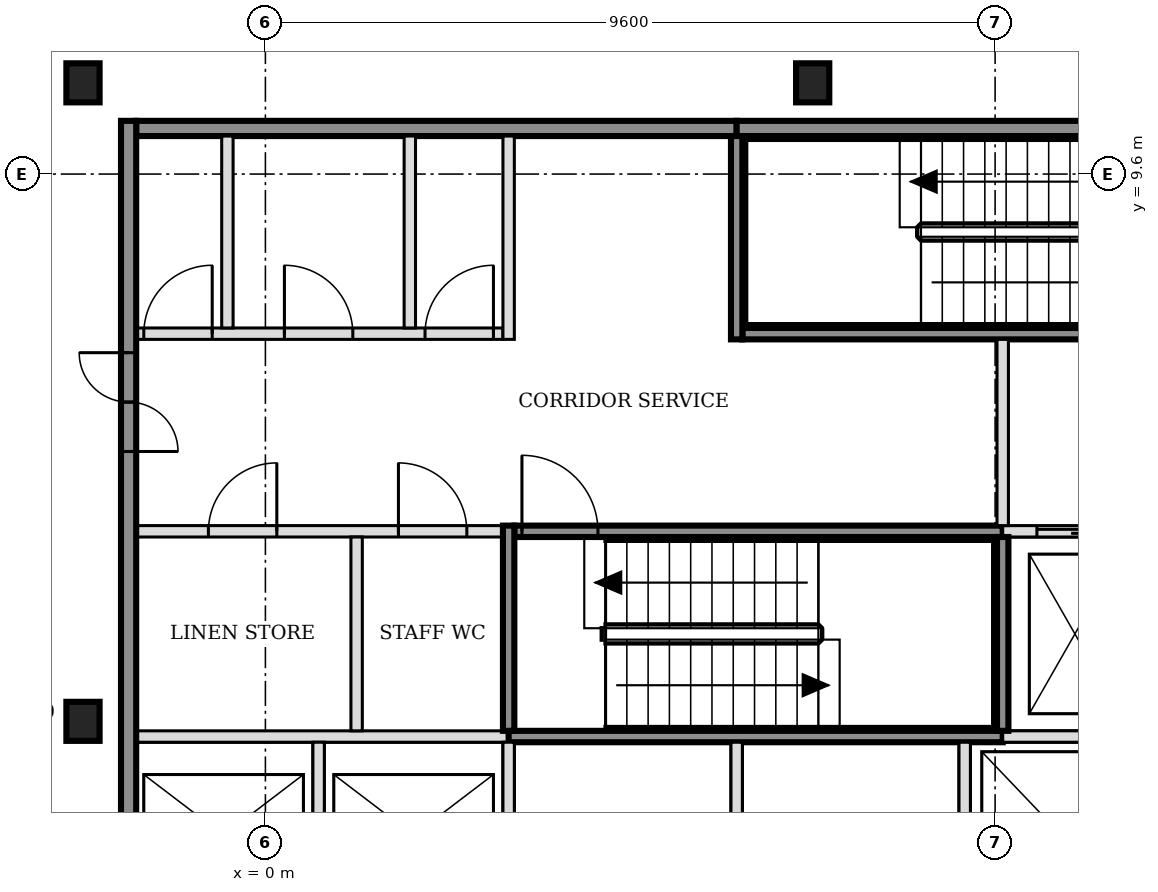
"""IFC4 building model, lengths in metres.
Left out: names, types, materials, properties, quantities, classifications, styles, units other than length and angle.
Written with IfcOpenShell. Run it as: python <this file> out.ifc"""

import sys

from ifc_helpers import new_model, si_unit, direction, frame, frame_2d, origin, origin_2d, place, context, subcontext, project, spatial, rectangle, i_section, extrude, element, fill, save


model = new_model("IFC4")
c1 = context("Model", 3, precision=1e-05, world=origin(), true_north=direction((0.0, 1.0)))
c2 = subcontext(c1, "Body", "Model", "MODEL_VIEW")
j1 = project(units=[si_unit("LENGTHUNIT", "METRE"), si_unit("PLANEANGLEUNIT", "RADIAN")], contexts=[c1])
p1 = place(None, origin())
s1 = spatial("IfcSite", under=j1, at=p1, CompositionType="ELEMENT")
p2 = place(p1, origin())
s2 = spatial("IfcBuilding", under=s1, at=p2, CompositionType="ELEMENT")
p3 = place(p2, frame((0.0, 0.0, 79.8)))
s3 = spatial("IfcBuildingStorey", under=s2, at=p3, CompositionType="ELEMENT", Elevation=79.8)
for number, where, z_axis, x_axis in (
    (1, (-2.4, 2.4, -0.15), (0.0, 0.0, 1.0), (1.0, 0.0, 0.0)),
    (2, (-2.4, 10.8, -0.15), (0.0, 0.0, 1.0), (1.0, 0.0, 0.0)),
    (3, (7.2, 10.8, -0.15), (0.0, 0.0, 1.0), (1.0, 0.0, 0.0)),
):
    element("IfcColumn", number, at=place(p3, frame(where, z_axis=z_axis, x_axis=x_axis)), inside=s3, PredefinedType="COLUMN", context=c2, shape_type="SweptSolid", body=[
        extrude(i_section(OverallWidth=0.437, OverallDepth=0.514, WebThickness=0.061, FlangeThickness=0.097, FilletRadius=0.015, at=origin_2d()), origin(), (0.0, 0.0, 1.0), 3.6),
    ])
p4 = place(p3, frame((-1.7, 2.2, 0.0), z_axis=(0.0, 0.0, 1.0), x_axis=(1.0, 0.0, 0.0)))
e4 = element("IfcWall", 4, at=p4, inside=s3, PredefinedType="SOLIDWALL", context=c2, shape_type="SweptSolid", body=[
    extrude(rectangle(XDim=4.9, YDim=0.15, at=frame_2d((2.45, 0.0))), origin(), (0.0, 0.0, 1.0), 3.45),
])
p5 = place(p3, frame((3.2, 2.2, 0.0), z_axis=(0.0, 0.0, 1.0), x_axis=(1.0, 0.0, 0.0)))
e5 = element("IfcWall", 5, at=p5, inside=s3, PredefinedType="SOLIDWALL", context=c2, shape_type="SweptSolid", body=[
    extrude(rectangle(XDim=6.5, YDim=0.15, at=frame_2d((3.25, 0.0))), origin(), (0.0, 0.0, 1.0), 3.45),
])
p6 = place(p3, frame((9.7, 2.2, 0.0), z_axis=(0.0, 0.0, 1.0), x_axis=(1.0, 0.0, 0.0)))
e6 = element("IfcWall", 6, at=p6, inside=s3, PredefinedType="SOLIDWALL", context=c2, shape_type="SweptSolid", body=[
    extrude(rectangle(XDim=4.525, YDim=0.15, at=frame_2d((2.263, 0.0))), origin(), (0.0, 0.0, 1.0), 3.45),
])
p7 = place(p3, frame((-1.7, 4.9, 0.0), z_axis=(0.0, 0.0, 1.0), x_axis=(1.0, 0.0, 0.0)))
e7 = element("IfcWall", 7, at=p7, inside=s3, PredefinedType="PARTITIONING", context=c2, shape_type="SweptSolid", body=[
    extrude(rectangle(XDim=4.825, YDim=0.15, at=frame_2d((2.413, 0.0))), origin(), (0.0, 0.0, 1.0), 3.45),
])
p8 = place(p7, frame((0.95, 0.0, 0.0)))
e8 = element("IfcOpeningElement", 8, at=p8, cuts=e7, PredefinedType="OPENING", context=c2, shape_type="SweptSolid", body=[
    extrude(rectangle(XDim=0.9, YDim=2.1, at=frame_2d((0.45, 1.05))), frame((0.0, 0.085, 0.0), z_axis=(0.0, -1.0, 0.0), x_axis=(1.0, 0.0, 0.0)), (0.0, 0.0, 1.0), 0.17),
])
p9 = place(p7, frame((3.45, 0.0, 0.0)))
e9 = element("IfcOpeningElement", 9, at=p9, cuts=e7, PredefinedType="OPENING", context=c2, shape_type="SweptSolid", body=[
    extrude(rectangle(XDim=0.9, YDim=2.1, at=frame_2d((0.45, 1.05))), frame((0.0, 0.085, 0.0), z_axis=(0.0, -1.0, 0.0), x_axis=(1.0, 0.0, 0.0)), (0.0, 0.0, 1.0), 0.17),
])
p10 = place(p3, frame((3.275, 4.9, 0.0), z_axis=(0.0, 0.0, 1.0), x_axis=(1.0, 0.0, 0.0)))
e10 = element("IfcWall", 10, at=p10, inside=s3, PredefinedType="SOLIDWALL", context=c2, shape_type="SweptSolid", body=[
    extrude(rectangle(XDim=6.425, YDim=0.15, at=frame_2d((3.212, 0.0))), origin(), (0.0, 0.0, 1.0), 3.45),
])
p11 = place(p10, frame((0.1, 0.0, 0.0)))
e11 = element("IfcOpeningElement", 11, at=p11, cuts=e10, PredefinedType="OPENING", context=c2, shape_type="SweptSolid", body=[
    extrude(rectangle(XDim=1.0, YDim=2.1, at=frame_2d((0.5, 1.05))), frame((0.0, 0.085, 0.0), z_axis=(0.0, -1.0, 0.0), x_axis=(1.0, 0.0, 0.0)), (0.0, 0.0, 1.0), 0.17),
])
p12 = place(p3, frame((9.7, 4.9, 0.0), z_axis=(0.0, 0.0, 1.0), x_axis=(1.0, 0.0, 0.0)))
e12 = element("IfcWall", 12, at=p12, inside=s3, PredefinedType="SOLIDWALL", context=c2, shape_type="SweptSolid", body=[
    extrude(rectangle(XDim=6.4, YDim=0.15, at=frame_2d((3.2, 0.0))), origin(), (0.0, 0.0, 1.0), 3.45),
])
p13 = place(p12, frame((0.45, 0.0, 0.0)))
e13 = element("IfcOpeningElement", 13, at=p13, cuts=e12, PredefinedType="OPENING", context=c2, shape_type="SweptSolid", body=[
    extrude(rectangle(XDim=1.0, YDim=2.1, at=frame_2d((0.5, 1.05))), frame((0.0, 0.085, 0.0), z_axis=(0.0, -1.0, 0.0), x_axis=(1.0, 0.0, 0.0)), (0.0, 0.0, 1.0), 0.17),
])
p14 = place(p12, frame((2.35, 0.0, 0.0)))
e14 = element("IfcOpeningElement", 14, at=p14, cuts=e12, PredefinedType="OPENING", context=c2, shape_type="SweptSolid", body=[
    extrude(rectangle(XDim=1.0, YDim=2.1, at=frame_2d((0.5, 1.05))), frame((0.0, 0.085, 0.0), z_axis=(0.0, -1.0, 0.0), x_axis=(1.0, 0.0, 0.0)), (0.0, 0.0, 1.0), 0.17),
])
p15 = place(p12, frame((4.7, 0.0, 0.0)))
e15 = element("IfcOpeningElement", 15, at=p15, cuts=e12, PredefinedType="OPENING", context=c2, shape_type="SweptSolid", body=[
    extrude(rectangle(XDim=0.9, YDim=2.1, at=frame_2d((0.45, 1.05))), frame((0.0, 0.085, 0.0), z_axis=(0.0, -1.0, 0.0), x_axis=(1.0, 0.0, 0.0)), (0.0, 0.0, 1.0), 0.17),
])
p16 = place(p3, frame((-1.7, 7.5, 0.0), z_axis=(0.0, 0.0, 1.0), x_axis=(1.0, 0.0, 0.0)))
e16 = element("IfcWall", 16, at=p16, inside=s3, PredefinedType="PARTITIONING", context=c2, shape_type="SweptSolid", body=[
    extrude(rectangle(XDim=4.825, YDim=0.15, at=frame_2d((2.413, 0.0))), origin(), (0.0, 0.0, 1.0), 3.45),
])
p17 = place(p16, frame((0.1, 0.0, 0.0)))
e17 = element("IfcOpeningElement", 17, at=p17, cuts=e16, PredefinedType="OPENING", context=c2, shape_type="SweptSolid", body=[
    extrude(rectangle(XDim=0.9, YDim=2.1, at=frame_2d((0.45, 1.05))), frame((0.0, 0.085, 0.0), z_axis=(0.0, -1.0, 0.0), x_axis=(1.0, 0.0, 0.0)), (0.0, 0.0, 1.0), 0.17),
])
p18 = place(p16, frame((1.95, 0.0, 0.0)))
e18 = element("IfcOpeningElement", 18, at=p18, cuts=e16, PredefinedType="OPENING", context=c2, shape_type="SweptSolid", body=[
    extrude(rectangle(XDim=0.9, YDim=2.1, at=frame_2d((0.45, 1.05))), frame((0.0, 0.085, 0.0), z_axis=(0.0, -1.0, 0.0), x_axis=(1.0, 0.0, 0.0)), (0.0, 0.0, 1.0), 0.17),
])
p19 = place(p16, frame((3.8, 0.0, 0.0)))
e19 = element("IfcOpeningElement", 19, at=p19, cuts=e16, PredefinedType="OPENING", context=c2, shape_type="SweptSolid", body=[
    extrude(rectangle(XDim=0.9, YDim=2.1, at=frame_2d((0.45, 1.05))), frame((0.0, 0.085, 0.0), z_axis=(0.0, -1.0, 0.0), x_axis=(1.0, 0.0, 0.0)), (0.0, 0.0, 1.0), 0.17),
])
p20 = place(p3, frame((6.275, 7.5, 0.0), z_axis=(0.0, 0.0, 1.0), x_axis=(1.0, 0.0, 0.0)))
e20 = element("IfcWall", 20, at=p20, inside=s3, PredefinedType="SOLIDWALL", context=c2, shape_type="SweptSolid", body=[
    extrude(rectangle(XDim=6.425, YDim=0.15, at=frame_2d((3.212, 0.0))), origin(), (0.0, 0.0, 1.0), 3.45),
])
p21 = place(p20, frame((5.225, 0.0, 0.0)))
e21 = element("IfcOpeningElement", 21, at=p21, cuts=e20, PredefinedType="OPENING", context=c2, shape_type="SweptSolid", body=[
    extrude(rectangle(XDim=1.0, YDim=2.1, at=frame_2d((0.5, 1.05))), frame((0.0, 0.085, 0.0), z_axis=(0.0, -1.0, 0.0), x_axis=(1.0, 0.0, 0.0)), (0.0, 0.0, 1.0), 0.17),
])
p22 = place(p3, frame((-1.7, 10.2, 0.0), z_axis=(0.0, 0.0, 1.0), x_axis=(1.0, 0.0, 0.0)))
e22 = element("IfcWall", 22, at=p22, inside=s3, PredefinedType="SOLIDWALL", context=c2, shape_type="SweptSolid", body=[
    extrude(rectangle(XDim=7.9, YDim=0.2, at=frame_2d((3.95, 0.0))), origin(), (0.0, 0.0, 1.0), 3.45),
])
p23 = place(p3, frame((6.2, 10.2, 0.0), z_axis=(0.0, 0.0, 1.0), x_axis=(1.0, 0.0, 0.0)))
e23 = element("IfcWall", 23, at=p23, inside=s3, PredefinedType="SOLIDWALL", context=c2, shape_type="SweptSolid", body=[
    extrude(rectangle(XDim=6.5, YDim=0.2, at=frame_2d((3.25, 0.0))), origin(), (0.0, 0.0, 1.0), 3.45),
])
p24 = place(p3, frame((-1.8, -5.5, 0.0), z_axis=(0.0, 0.0, 1.0), x_axis=(0.0, 1.0, 0.0)))
e24 = element("IfcWall", 24, at=p24, inside=s3, PredefinedType="SOLIDWALL", context=c2, shape_type="SweptSolid", body=[
    extrude(rectangle(XDim=15.8, YDim=0.2, at=frame_2d((7.9, 0.0))), origin(), (0.0, 0.0, 1.0), 3.45),
])
p25 = place(p24, frame((3.05, 0.0, 0.0)))
e25 = element("IfcOpeningElement", 25, at=p25, cuts=e24, PredefinedType="OPENING", context=c2, shape_type="SweptSolid", body=[
    extrude(rectangle(XDim=1.3, YDim=2.1, at=frame_2d((0.65, 1.05))), frame((0.0, 0.11, 0.0), z_axis=(0.0, -1.0, 0.0), x_axis=(1.0, 0.0, 0.0)), (0.0, 0.0, 1.0), 0.22),
])
p26 = place(p24, frame((11.45, 0.0, 0.0)))
e26 = element("IfcOpeningElement", 26, at=p26, cuts=e24, PredefinedType="OPENING", context=c2, shape_type="SweptSolid", body=[
    extrude(rectangle(XDim=1.3, YDim=2.1, at=frame_2d((0.65, 1.05))), frame((0.0, 0.11, 0.0), z_axis=(0.0, -1.0, 0.0), x_axis=(1.0, 0.0, 0.0)), (0.0, 0.0, 1.0), 0.22),
])
p27 = place(p3, frame((-0.5, 7.575, 0.0), z_axis=(0.0, 0.0, 1.0), x_axis=(0.0, 1.0, 0.0)))
e27 = element("IfcWall", 27, at=p27, inside=s3, PredefinedType="PARTITIONING", context=c2, shape_type="SweptSolid", body=[
    extrude(rectangle(XDim=2.525, YDim=0.15, at=frame_2d((1.263, 0.0))), origin(), (0.0, 0.0, 1.0), 3.45),
])
p28 = place(p3, frame((0.7, -0.325, 0.0), z_axis=(0.0, 0.0, 1.0), x_axis=(0.0, 1.0, 0.0)))
e28 = element("IfcWall", 28, at=p28, inside=s3, PredefinedType="SOLIDWALL", context=c2, shape_type="SweptSolid", body=[
    extrude(rectangle(XDim=2.45, YDim=0.15, at=frame_2d((1.225, 0.0))), origin(), (0.0, 0.0, 1.0), 3.45),
])
p29 = place(p3, frame((1.2, 2.275, 0.0), z_axis=(0.0, 0.0, 1.0), x_axis=(0.0, 1.0, 0.0)))
e29 = element("IfcWall", 29, at=p29, inside=s3, PredefinedType="PARTITIONING", context=c2, shape_type="SweptSolid", body=[
    extrude(rectangle(XDim=2.55, YDim=0.15, at=frame_2d((1.275, 0.0))), origin(), (0.0, 0.0, 1.0), 3.45),
])
p30 = place(p3, frame((1.9, 7.575, 0.0), z_axis=(0.0, 0.0, 1.0), x_axis=(0.0, 1.0, 0.0)))
e30 = element("IfcWall", 30, at=p30, inside=s3, PredefinedType="PARTITIONING", context=c2, shape_type="SweptSolid", body=[
    extrude(rectangle(XDim=2.525, YDim=0.15, at=frame_2d((1.263, 0.0))), origin(), (0.0, 0.0, 1.0), 3.45),
])
p31 = place(p3, frame((3.2, -0.325, 0.0), z_axis=(0.0, 0.0, 1.0), x_axis=(0.0, 1.0, 0.0)))
e31 = element("IfcWall", 31, at=p31, inside=s3, PredefinedType="SOLIDWALL", context=c2, shape_type="SweptSolid", body=[
    extrude(rectangle(XDim=2.45, YDim=0.15, at=frame_2d((1.225, 0.0))), origin(), (0.0, 0.0, 1.0), 3.45),
])
p32 = place(p3, frame((3.2, 2.275, 0.0), z_axis=(0.0, 0.0, 1.0), x_axis=(0.0, 1.0, 0.0)))
e32 = element("IfcWall", 32, at=p32, inside=s3, PredefinedType="SOLIDWALL", context=c2, shape_type="SweptSolid", body=[
    extrude(rectangle(XDim=2.7, YDim=0.15, at=frame_2d((1.35, 0.0))), origin(), (0.0, 0.0, 1.0), 3.45),
])
p33 = place(p3, frame((3.2, 7.425, 0.0), z_axis=(0.0, 0.0, 1.0), x_axis=(0.0, 1.0, 0.0)))
e33 = element("IfcWall", 33, at=p33, inside=s3, PredefinedType="PARTITIONING", context=c2, shape_type="SweptSolid", body=[
    extrude(rectangle(XDim=2.675, YDim=0.15, at=frame_2d((1.337, 0.0))), origin(), (0.0, 0.0, 1.0), 3.45),
])
p34 = place(p3, frame((6.2, -0.325, 0.0), z_axis=(0.0, 0.0, 1.0), x_axis=(0.0, 1.0, 0.0)))
e34 = element("IfcWall", 34, at=p34, inside=s3, PredefinedType="SOLIDWALL", context=c2, shape_type="SweptSolid", body=[
    extrude(rectangle(XDim=2.45, YDim=0.15, at=frame_2d((1.225, 0.0))), origin(), (0.0, 0.0, 1.0), 3.45),
])
p35 = place(p3, frame((6.2, 7.425, 0.0), z_axis=(0.0, 0.0, 1.0), x_axis=(0.0, 1.0, 0.0)))
e35 = element("IfcWall", 35, at=p35, inside=s3, PredefinedType="SOLIDWALL", context=c2, shape_type="SweptSolid", body=[
    extrude(rectangle(XDim=2.675, YDim=0.15, at=frame_2d((1.337, 0.0))), origin(), (0.0, 0.0, 1.0), 3.45),
])
p36 = place(p3, frame((9.2, -0.325, 0.0), z_axis=(0.0, 0.0, 1.0), x_axis=(0.0, 1.0, 0.0)))
e36 = element("IfcWall", 36, at=p36, inside=s3, PredefinedType="SOLIDWALL", context=c2, shape_type="SweptSolid", body=[
    extrude(rectangle(XDim=2.45, YDim=0.15, at=frame_2d((1.225, 0.0))), origin(), (0.0, 0.0, 1.0), 3.45),
])
p37 = place(p3, frame((9.7, 2.275, 0.0), z_axis=(0.0, 0.0, 1.0), x_axis=(0.0, 1.0, 0.0)))
e37 = element("IfcWall", 37, at=p37, inside=s3, PredefinedType="SOLIDWALL", context=c2, shape_type="SweptSolid", body=[
    extrude(rectangle(XDim=2.55, YDim=0.15, at=frame_2d((1.275, 0.0))), origin(), (0.0, 0.0, 1.0), 3.45),
])
p38 = place(p3, frame((9.7, 4.975, 0.0), z_axis=(0.0, 0.0, 1.0), x_axis=(0.0, 1.0, 0.0)))
e38 = element("IfcWall", 38, at=p38, inside=s3, PredefinedType="SOLIDWALL", context=c2, shape_type="SweptSolid", body=[
    extrude(rectangle(XDim=2.45, YDim=0.15, at=frame_2d((1.225, 0.0))), origin(), (0.0, 0.0, 1.0), 3.45),
])
p39 = place(p13, origin())
e39 = element("IfcDoor", 39, at=p39, inside=s3, OperationType="DOUBLE_DOOR_SLIDING", PredefinedType="DOOR", context=c2, shape_type="SweptSolid", body=[
    extrude(rectangle(XDim=1.0, YDim=2.1, at=frame_2d((0.5, 1.05))), frame((0.0, 0.025, 0.0), z_axis=(0.0, -1.0, 0.0), x_axis=(1.0, 0.0, 0.0)), (0.0, 0.0, 1.0), 0.05),
])
fill(e13, e39)
p40 = place(p11, origin())
e40 = element("IfcDoor", 40, at=p40, inside=s3, OperationType="SINGLE_SWING_LEFT", PredefinedType="DOOR", context=c2, shape_type="SweptSolid", body=[
    extrude(rectangle(XDim=1.0, YDim=2.1, at=frame_2d((0.5, 1.05))), frame((0.0, 0.025, 0.0), z_axis=(0.0, -1.0, 0.0), x_axis=(1.0, 0.0, 0.0)), (0.0, 0.0, 1.0), 0.05),
])
fill(e11, e40)
p41 = place(p26, origin())
e41 = element("IfcDoor", 41, at=p41, inside=s3, OperationType="DOUBLE_DOOR_SINGLE_SWING", PredefinedType="DOOR", context=c2, shape_type="SweptSolid", body=[
    extrude(rectangle(XDim=1.3, YDim=2.1, at=frame_2d((0.65, 1.05))), frame((0.0, 0.025, 0.0), z_axis=(0.0, -1.0, 0.0), x_axis=(1.0, 0.0, 0.0)), (0.0, 0.0, 1.0), 0.05),
])
fill(e26, e41)
p42 = place(p8, origin())
e42 = element("IfcDoor", 42, at=p42, inside=s3, OperationType="SINGLE_SWING_RIGHT", PredefinedType="DOOR", context=c2, shape_type="SweptSolid", body=[
    extrude(rectangle(XDim=0.9, YDim=2.1, at=frame_2d((0.45, 1.05))), frame((0.0, 0.025, 0.0), z_axis=(0.0, -1.0, 0.0), x_axis=(1.0, 0.0, 0.0)), (0.0, 0.0, 1.0), 0.05),
])
fill(e8, e42)
p43 = place(p9, origin())
e43 = element("IfcDoor", 43, at=p43, inside=s3, OperationType="SINGLE_SWING_LEFT", PredefinedType="DOOR", context=c2, shape_type="SweptSolid", body=[
    extrude(rectangle(XDim=0.9, YDim=2.1, at=frame_2d((0.45, 1.05))), frame((0.0, 0.025, 0.0), z_axis=(0.0, -1.0, 0.0), x_axis=(1.0, 0.0, 0.0)), (0.0, 0.0, 1.0), 0.05),
])
fill(e9, e43)
p44 = place(p17, origin())
e44 = element("IfcDoor", 44, at=p44, inside=s3, OperationType="SINGLE_SWING_RIGHT", PredefinedType="DOOR", context=c2, shape_type="SweptSolid", body=[
    extrude(rectangle(XDim=0.9, YDim=2.1, at=frame_2d((0.45, 1.05))), frame((0.0, 0.025, 0.0), z_axis=(0.0, -1.0, 0.0), x_axis=(1.0, 0.0, 0.0)), (0.0, 0.0, 1.0), 0.05),
])
fill(e17, e44)
p45 = place(p18, origin())
e45 = element("IfcDoor", 45, at=p45, inside=s3, OperationType="SINGLE_SWING_LEFT", PredefinedType="DOOR", context=c2, shape_type="SweptSolid", body=[
    extrude(rectangle(XDim=0.9, YDim=2.1, at=frame_2d((0.45, 1.05))), frame((0.0, 0.025, 0.0), z_axis=(0.0, -1.0, 0.0), x_axis=(1.0, 0.0, 0.0)), (0.0, 0.0, 1.0), 0.05),
])
fill(e18, e45)
p46 = place(p19, origin())
e46 = element("IfcDoor", 46, at=p46, inside=s3, OperationType="SINGLE_SWING_RIGHT", PredefinedType="DOOR", context=c2, shape_type="SweptSolid", body=[
    extrude(rectangle(XDim=0.9, YDim=2.1, at=frame_2d((0.45, 1.05))), frame((0.0, 0.025, 0.0), z_axis=(0.0, -1.0, 0.0), x_axis=(1.0, 0.0, 0.0)), (0.0, 0.0, 1.0), 0.05),
])
fill(e19, e46)
save(model, sys.argv[1])
